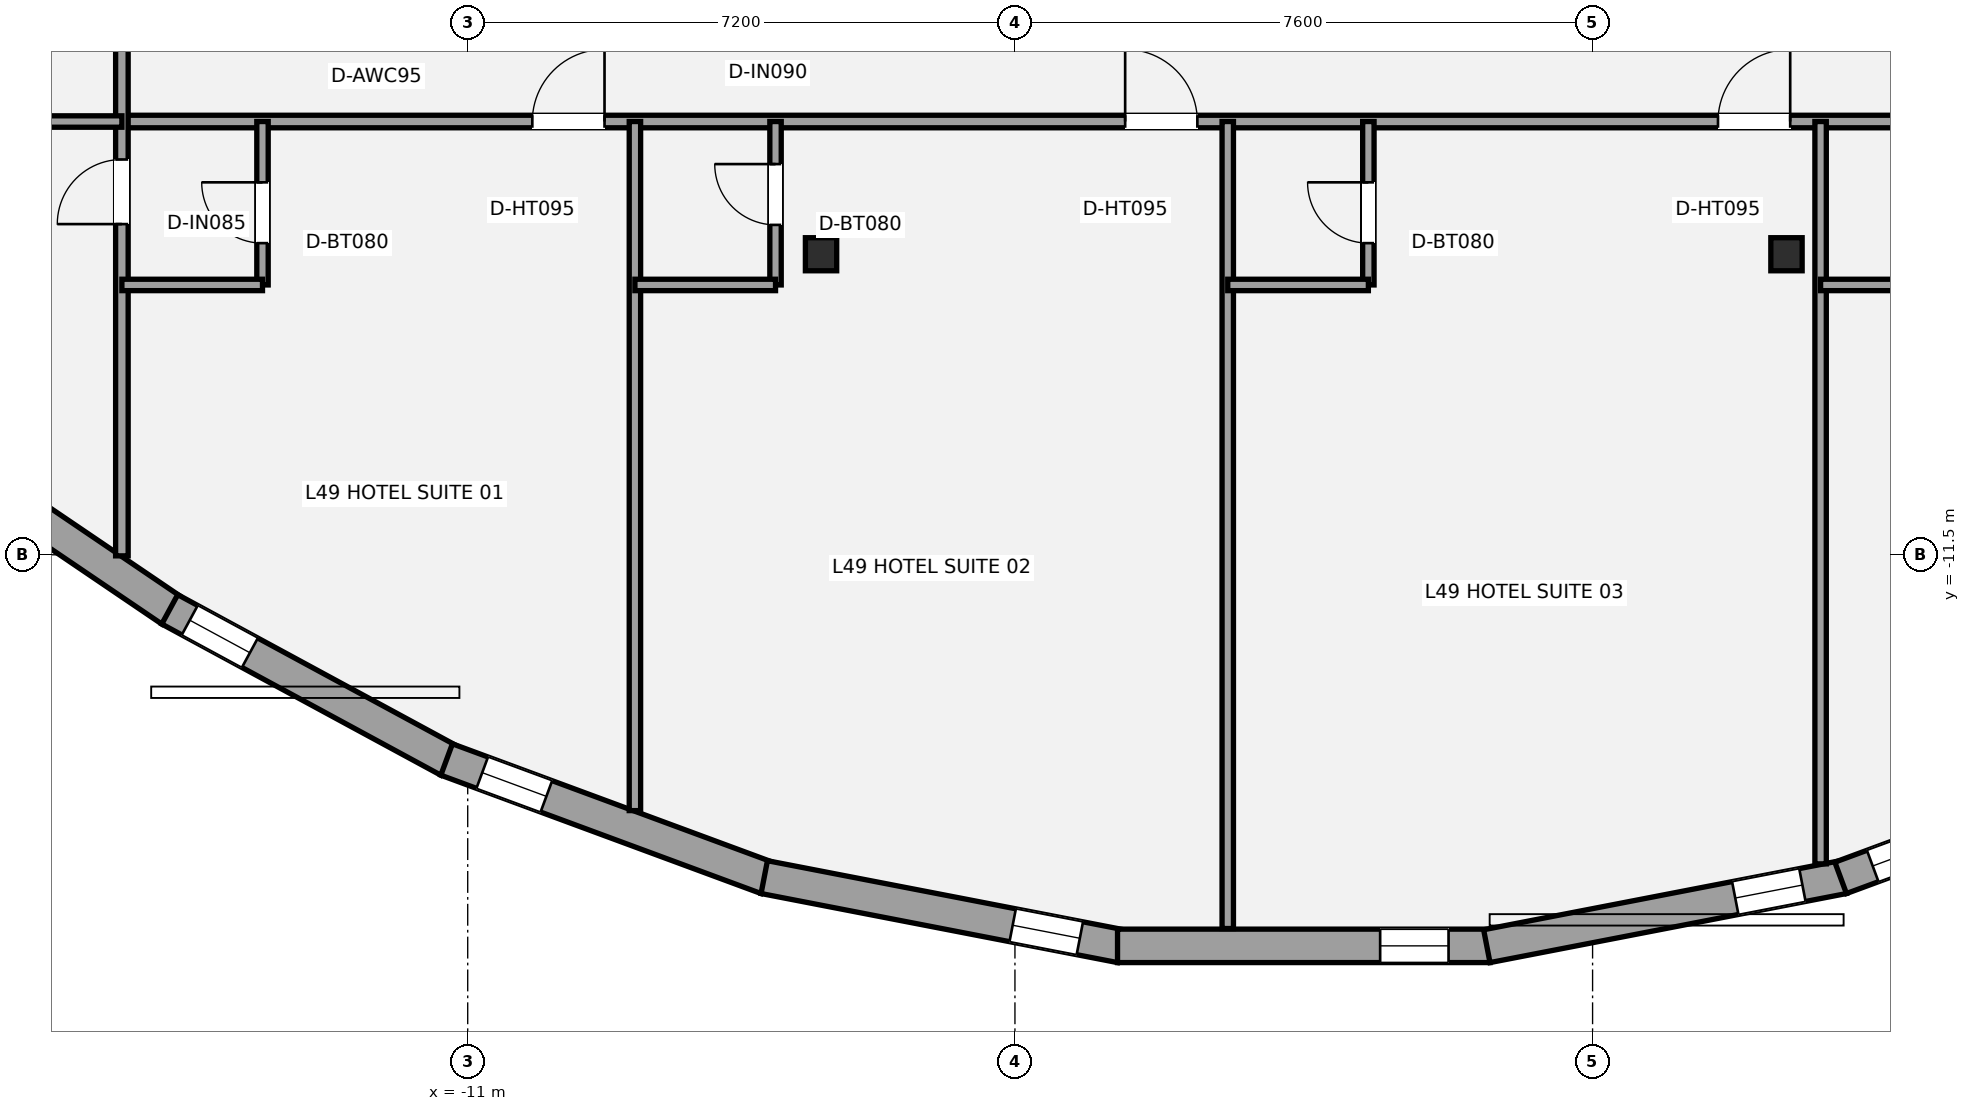
"""IFC4 building model, lengths in metres.
Left out: names, types, materials, properties, quantities, classifications, styles, units other than length and angle.
Written with IfcOpenShell. Run it as: python <this file> out.ifc"""

import sys

from ifc_helpers import new_model, si_unit, direction, frame, frame_2d, origin, origin_2d, place, context, subcontext, project, spatial, rectangle, i_section, extrude, element, fill, save


model = new_model("IFC4")
c1 = context("Model", 3, precision=1e-05, world=origin(), true_north=direction((0.0, 1.0)))
c2 = subcontext(c1, "Body", "Model", "MODEL_VIEW")
j1 = project(units=[si_unit("LENGTHUNIT", "METRE"), si_unit("PLANEANGLEUNIT", "RADIAN")], contexts=[c1])
p1 = place(None, origin())
s1 = spatial("IfcSite", under=j1, at=p1, CompositionType="ELEMENT")
p2 = place(p1, origin())
s2 = spatial("IfcBuilding", under=s1, at=p2, CompositionType="ELEMENT")
p3 = place(p2, frame((0.0, 0.0, 179.0)))
s3 = spatial("IfcBuildingStorey", under=s2, at=p3, CompositionType="ELEMENT", Elevation=179.0)
for number, where, z_axis, x_axis in (
    (1, (-6.351, -7.546, 0.0), (0.0, 0.0, 1.0), (1.0, 0.0, 0.0)),
    (2, (6.351, -7.546, 0.0), (0.0, 0.0, 1.0), (1.0, 0.0, 0.0)),
):
    element("IfcColumn", number, at=place(p3, frame(where, z_axis=z_axis, x_axis=x_axis)), inside=s3, PredefinedType="COLUMN", context=c2, shape_type="SweptSolid", body=[
        extrude(i_section(OverallWidth=0.412, OverallDepth=0.435, WebThickness=0.036, FlangeThickness=0.057, at=origin_2d()), origin(), (0.0, 0.0, 1.0), 3.2),
    ])
p4 = place(p3, frame((-14.902, -12.229, 0.0), z_axis=(0.0, 0.0, 1.0), x_axis=(-0.827725942945, 0.561132572015, 0.0)))
e3 = element("IfcWall", 3, at=p4, inside=s3, PredefinedType="STANDARD", context=c2, shape_type="SweptSolid", body=[
    extrude(rectangle(XDim=3.966, YDim=0.44, at=frame_2d((1.983, 0.0))), origin(), (0.0, 0.0, 1.0), 2.315),
])
p5 = place(p4, frame((2.768, 0.0, 0.58)))
e4 = element("IfcOpeningElement", 4, at=p5, cuts=e3, PredefinedType="OPENING", context=c2, shape_type="SweptSolid", body=[
    extrude(rectangle(XDim=0.9, YDim=1.35, at=frame_2d((0.45, 0.675))), frame((0.0, 0.23, 0.0), z_axis=(0.0, -1.0, 0.0), x_axis=(1.0, 0.0, 0.0)), (0.0, 0.0, 1.0), 0.46),
])
p6 = place(p3, frame((-11.249, -14.206, 0.0), z_axis=(0.0, 0.0, 1.0), x_axis=(-0.879306250646, 0.476256776933, 0.0)))
e5 = element("IfcWall", 5, at=p6, inside=s3, PredefinedType="STANDARD", context=c2, shape_type="SweptSolid", body=[
    extrude(rectangle(XDim=4.175, YDim=0.44, at=frame_2d((2.088, 0.0))), origin(), (0.0, 0.0, 1.0), 2.315),
])
p7 = place(p6, frame((2.976, 0.0, 0.58)))
e6 = element("IfcOpeningElement", 6, at=p7, cuts=e5, PredefinedType="OPENING", context=c2, shape_type="SweptSolid", body=[
    extrude(rectangle(XDim=0.9, YDim=1.35, at=frame_2d((0.45, 0.675))), frame((0.0, 0.23, 0.0), z_axis=(0.0, -1.0, 0.0), x_axis=(1.0, 0.0, 0.0)), (0.0, 0.0, 1.0), 0.46),
])
p8 = place(p3, frame((-7.064, -15.75, 0.0), z_axis=(0.0, 0.0, 1.0), x_axis=(-0.937993730452, 0.346652220004, 0.0)))
e7 = element("IfcWall", 7, at=p8, inside=s3, PredefinedType="STANDARD", context=c2, shape_type="SweptSolid", body=[
    extrude(rectangle(XDim=4.492, YDim=0.44, at=frame_2d((2.246, 0.0))), origin(), (0.0, 0.0, 1.0), 2.315),
])
p9 = place(p8, frame((3.093, 0.0, 0.58)))
e8 = element("IfcOpeningElement", 8, at=p9, cuts=e7, PredefinedType="OPENING", context=c2, shape_type="SweptSolid", body=[
    extrude(rectangle(XDim=0.9, YDim=1.35, at=frame_2d((0.45, 0.675))), frame((0.0, 0.23, 0.0), z_axis=(0.0, -1.0, 0.0), x_axis=(1.0, 0.0, 0.0)), (0.0, 0.0, 1.0), 0.46),
])
p10 = place(p3, frame((-2.408, -16.649, 0.0), z_axis=(0.0, 0.0, 1.0), x_axis=(-0.981751851942, 0.190166509166, 0.0)))
e9 = element("IfcWall", 9, at=p10, inside=s3, PredefinedType="STANDARD", context=c2, shape_type="SweptSolid", body=[
    extrude(rectangle(XDim=4.777, YDim=0.44, at=frame_2d((2.389, 0.0))), origin(), (0.0, 0.0, 1.0), 2.315),
])
p11 = place(p10, frame((0.548, 0.0, 0.58)))
e10 = element("IfcOpeningElement", 10, at=p11, cuts=e9, PredefinedType="OPENING", context=c2, shape_type="SweptSolid", body=[
    extrude(rectangle(XDim=0.9, YDim=1.35, at=frame_2d((0.45, 0.675))), frame((0.0, 0.23, 0.0), z_axis=(0.0, -1.0, 0.0), x_axis=(1.0, 0.0, 0.0)), (0.0, 0.0, 1.0), 0.46),
])
p12 = place(p3, frame((2.45, -16.645, 0.0), z_axis=(0.0, 0.0, 1.0), x_axis=(-1.0, 0.0, 0.0)))
e11 = element("IfcWall", 11, at=p12, inside=s3, PredefinedType="STANDARD", context=c2, shape_type="SweptSolid", body=[
    extrude(rectangle(XDim=4.9, YDim=0.44, at=frame_2d((2.45, 0.0))), origin(), (0.0, 0.0, 1.0), 2.315),
])
p13 = place(p12, frame((0.545, 0.0, 0.58)))
e12 = element("IfcOpeningElement", 12, at=p13, cuts=e11, PredefinedType="OPENING", context=c2, shape_type="SweptSolid", body=[
    extrude(rectangle(XDim=0.9, YDim=1.35, at=frame_2d((0.45, 0.675))), frame((0.0, 0.23, 0.0), z_axis=(0.0, -1.0, 0.0), x_axis=(1.0, 0.0, 0.0)), (0.0, 0.0, 1.0), 0.46),
])
p14 = place(p3, frame((7.098, -15.741, 0.0), z_axis=(0.0, 0.0, 1.0), x_axis=(-0.981751851942, -0.190166509166, 0.0)))
e13 = element("IfcWall", 13, at=p14, inside=s3, PredefinedType="STANDARD", context=c2, shape_type="SweptSolid", body=[
    extrude(rectangle(XDim=4.777, YDim=0.44, at=frame_2d((2.389, 0.0))), origin(), (0.0, 0.0, 1.0), 2.315),
])
p15 = place(p14, frame((0.548, 0.0, 0.58)))
e14 = element("IfcOpeningElement", 14, at=p15, cuts=e13, PredefinedType="OPENING", context=c2, shape_type="SweptSolid", body=[
    extrude(rectangle(XDim=0.9, YDim=1.35, at=frame_2d((0.45, 0.675))), frame((0.0, 0.23, 0.0), z_axis=(0.0, -1.0, 0.0), x_axis=(1.0, 0.0, 0.0)), (0.0, 0.0, 1.0), 0.46),
])
p16 = place(p3, frame((11.277, -14.193, 0.0), z_axis=(0.0, 0.0, 1.0), x_axis=(-0.937993730452, -0.346652220004, 0.0)))
e15 = element("IfcWall", 15, at=p16, inside=s3, PredefinedType="STANDARD", context=c2, shape_type="SweptSolid", body=[
    extrude(rectangle(XDim=4.492, YDim=0.44, at=frame_2d((2.246, 0.0))), origin(), (0.0, 0.0, 1.0), 2.315),
])
p17 = place(p16, frame((3.143, 0.0, 0.58)))
e16 = element("IfcOpeningElement", 16, at=p17, cuts=e15, PredefinedType="OPENING", context=c2, shape_type="SweptSolid", body=[
    extrude(rectangle(XDim=0.9, YDim=1.35, at=frame_2d((0.45, 0.675))), frame((0.0, 0.23, 0.0), z_axis=(0.0, -1.0, 0.0), x_axis=(1.0, 0.0, 0.0)), (0.0, 0.0, 1.0), 0.46),
])
p18 = place(p3, frame((-15.55, -5.8, 0.0), z_axis=(0.0, 0.0, 1.0), x_axis=(1.0, 0.0, 0.0)))
e17 = element("IfcWall", 17, at=p18, inside=s3, PredefinedType="PARTITIONING", context=c2, shape_type="SweptSolid", body=[
    extrude(rectangle(XDim=31.1, YDim=0.165, at=frame_2d((15.55, 0.0))), origin(), (0.0, 0.0, 1.0), 2.398),
])
p19 = place(p18, frame((5.4, 0.0, 0.0)))
e18 = element("IfcOpeningElement", 18, at=p19, cuts=e17, PredefinedType="OPENING", context=c2, shape_type="SweptSolid", body=[
    extrude(rectangle(XDim=0.95, YDim=2.15, at=frame_2d((0.475, 1.075))), frame((0.0, 0.093, 0.0), z_axis=(0.0, -1.0, 0.0), x_axis=(1.0, 0.0, 0.0)), (0.0, 0.0, 1.0), 0.185),
])
p20 = place(p18, frame((13.2, 0.0, 0.0)))
e19 = element("IfcOpeningElement", 19, at=p20, cuts=e17, PredefinedType="OPENING", context=c2, shape_type="SweptSolid", body=[
    extrude(rectangle(XDim=0.95, YDim=2.15, at=frame_2d((0.475, 1.075))), frame((0.0, 0.093, 0.0), z_axis=(0.0, -1.0, 0.0), x_axis=(1.0, 0.0, 0.0)), (0.0, 0.0, 1.0), 0.185),
])
p21 = place(p18, frame((21.0, 0.0, 0.0)))
e20 = element("IfcOpeningElement", 20, at=p21, cuts=e17, PredefinedType="OPENING", context=c2, shape_type="SweptSolid", body=[
    extrude(rectangle(XDim=0.95, YDim=2.15, at=frame_2d((0.475, 1.075))), frame((0.0, 0.093, 0.0), z_axis=(0.0, -1.0, 0.0), x_axis=(1.0, 0.0, 0.0)), (0.0, 0.0, 1.0), 0.185),
])
p22 = place(p18, frame((29.75, 0.0, 0.0)))
e21 = element("IfcOpeningElement", 21, at=p22, cuts=e17, PredefinedType="OPENING", context=c2, shape_type="SweptSolid", body=[
    extrude(rectangle(XDim=0.95, YDim=2.15, at=frame_2d((0.475, 1.075))), frame((0.0, 0.093, 0.0), z_axis=(0.0, -1.0, 0.0), x_axis=(1.0, 0.0, 0.0)), (0.0, 0.0, 1.0), 0.185),
])
p23 = place(p3, frame((-15.55, -11.514, 0.0), z_axis=(0.0, 0.0, 1.0), x_axis=(0.0, 1.0, 0.0)))
e22 = element("IfcWall", 22, at=p23, inside=s3, PredefinedType="PARTITIONING", context=c2, shape_type="SweptSolid", body=[
    extrude(rectangle(XDim=19.064, YDim=0.165, at=frame_2d((9.532, 0.0))), origin(), (0.0, 0.0, 1.0), 2.473),
])
p24 = place(p23, frame((4.365, 0.0, 0.0)))
e23 = element("IfcOpeningElement", 23, at=p24, cuts=e22, PredefinedType="OPENING", context=c2, shape_type="SweptSolid", body=[
    extrude(rectangle(XDim=0.85, YDim=2.1, at=frame_2d((0.425, 1.05))), frame((0.0, 0.093, 0.0), z_axis=(0.0, -1.0, 0.0), x_axis=(1.0, 0.0, 0.0)), (0.0, 0.0, 1.0), 0.185),
])
p25 = place(p23, frame((7.515, 0.0, 0.0)))
e24 = element("IfcOpeningElement", 24, at=p25, cuts=e22, PredefinedType="OPENING", context=c2, shape_type="SweptSolid", body=[
    extrude(rectangle(XDim=1.0, YDim=2.15, at=frame_2d((0.5, 1.075))), frame((0.0, 0.093, 0.0), z_axis=(0.0, -1.0, 0.0), x_axis=(1.0, 0.0, 0.0)), (0.0, 0.0, 1.0), 0.185),
])
p26 = place(p23, frame((11.915, 0.0, 0.0)))
e25 = element("IfcOpeningElement", 25, at=p26, cuts=e22, PredefinedType="OPENING", context=c2, shape_type="SweptSolid", body=[
    extrude(rectangle(XDim=1.0, YDim=2.15, at=frame_2d((0.5, 1.075))), frame((0.0, 0.093, 0.0), z_axis=(0.0, -1.0, 0.0), x_axis=(1.0, 0.0, 0.0)), (0.0, 0.0, 1.0), 0.185),
])
p27 = place(p23, frame((16.29, 0.0, 0.0)))
e26 = element("IfcOpeningElement", 26, at=p27, cuts=e22, PredefinedType="OPENING", context=c2, shape_type="SweptSolid", body=[
    extrude(rectangle(XDim=1.0, YDim=2.15, at=frame_2d((0.5, 1.075))), frame((0.0, 0.093, 0.0), z_axis=(0.0, -1.0, 0.0), x_axis=(1.0, 0.0, 0.0)), (0.0, 0.0, 1.0), 0.185),
])
p28 = place(p3, frame((-22.192, -5.8, 0.0), z_axis=(0.0, 0.0, 1.0), x_axis=(1.0, 0.0, 0.0)))
e27 = element("IfcWall", 27, at=p28, inside=s3, PredefinedType="PLUMBINGWALL", context=c2, shape_type="SweptSolid", body=[
    extrude(rectangle(XDim=6.642, YDim=0.15, at=frame_2d((3.321, 0.0))), origin(), (0.0, 0.0, 1.0), 2.473),
])
p29 = place(p3, frame((-8.8, -14.866, 0.0), z_axis=(0.0, 0.0, 1.0), x_axis=(0.0, 1.0, 0.0)))
e28 = element("IfcWall", 28, at=p29, inside=s3, PredefinedType="PLUMBINGWALL", context=c2, shape_type="SweptSolid", body=[
    extrude(rectangle(XDim=9.066, YDim=0.15, at=frame_2d((4.533, 0.0))), origin(), (0.0, 0.0, 1.0), 3.02),
])
p30 = place(p3, frame((-1.0, -16.417, 0.0), z_axis=(0.0, 0.0, 1.0), x_axis=(0.0, 1.0, 0.0)))
e29 = element("IfcWall", 29, at=p30, inside=s3, PredefinedType="PLUMBINGWALL", context=c2, shape_type="SweptSolid", body=[
    extrude(rectangle(XDim=10.617, YDim=0.15, at=frame_2d((5.309, 0.0))), origin(), (0.0, 0.0, 1.0), 2.473),
])
p31 = place(p3, frame((6.8, -15.566, 0.0), z_axis=(0.0, 0.0, 1.0), x_axis=(0.0, 1.0, 0.0)))
e30 = element("IfcWall", 30, at=p31, inside=s3, PredefinedType="PLUMBINGWALL", context=c2, shape_type="SweptSolid", body=[
    extrude(rectangle(XDim=9.766, YDim=0.15, at=frame_2d((4.883, 0.0))), origin(), (0.0, 0.0, 1.0), 2.473),
])
p32 = place(p3, frame((-13.7, -7.95, 0.0), z_axis=(0.0, 0.0, 1.0), x_axis=(0.0, 1.0, 0.0)))
e31 = element("IfcWall", 31, at=p32, inside=s3, PredefinedType="PLUMBINGWALL", context=c2, shape_type="SweptSolid", body=[
    extrude(rectangle(XDim=2.15, YDim=0.15, at=frame_2d((1.075, 0.0))), origin(), (0.0, 0.0, 1.0), 2.473),
])
p33 = place(p32, frame((0.55, 0.0, 0.0)))
e32 = element("IfcOpeningElement", 32, at=p33, cuts=e31, PredefinedType="OPENING", context=c2, shape_type="SweptSolid", body=[
    extrude(rectangle(XDim=0.8, YDim=2.1, at=frame_2d((0.4, 1.05))), frame((0.0, 0.085, 0.0), z_axis=(0.0, -1.0, 0.0), x_axis=(1.0, 0.0, 0.0)), (0.0, 0.0, 1.0), 0.17),
])
p34 = place(p3, frame((-15.55, -7.95, 0.0), z_axis=(0.0, 0.0, 1.0), x_axis=(1.0, 0.0, 0.0)))
e33 = element("IfcWall", 33, at=p34, inside=s3, PredefinedType="PLUMBINGWALL", context=c2, shape_type="SweptSolid", body=[
    extrude(rectangle(XDim=1.85, YDim=0.15, at=frame_2d((0.925, 0.0))), origin(), (0.0, 0.0, 1.0), 2.473),
])
p35 = place(p3, frame((-6.95, -7.95, 0.0), z_axis=(0.0, 0.0, 1.0), x_axis=(0.0, 1.0, 0.0)))
e34 = element("IfcWall", 34, at=p35, inside=s3, PredefinedType="PLUMBINGWALL", context=c2, shape_type="SweptSolid", body=[
    extrude(rectangle(XDim=2.15, YDim=0.15, at=frame_2d((1.075, 0.0))), origin(), (0.0, 0.0, 1.0), 2.473),
])
p36 = place(p35, frame((0.79, 0.0, 0.0)))
e35 = element("IfcOpeningElement", 35, at=p36, cuts=e34, PredefinedType="OPENING", context=c2, shape_type="SweptSolid", body=[
    extrude(rectangle(XDim=0.8, YDim=2.1, at=frame_2d((0.4, 1.05))), frame((0.0, 0.085, 0.0), z_axis=(0.0, -1.0, 0.0), x_axis=(1.0, 0.0, 0.0)), (0.0, 0.0, 1.0), 0.17),
])
p37 = place(p3, frame((-8.8, -7.95, 0.0), z_axis=(0.0, 0.0, 1.0), x_axis=(1.0, 0.0, 0.0)))
e36 = element("IfcWall", 36, at=p37, inside=s3, PredefinedType="PLUMBINGWALL", context=c2, shape_type="SweptSolid", body=[
    extrude(rectangle(XDim=1.85, YDim=0.15, at=frame_2d((0.925, 0.0))), origin(), (0.0, 0.0, 1.0), 2.473),
])
p38 = place(p3, frame((0.85, -7.95, 0.0), z_axis=(0.0, 0.0, 1.0), x_axis=(0.0, 1.0, 0.0)))
e37 = element("IfcWall", 37, at=p38, inside=s3, PredefinedType="PLUMBINGWALL", context=c2, shape_type="SweptSolid", body=[
    extrude(rectangle(XDim=2.15, YDim=0.15, at=frame_2d((1.075, 0.0))), origin(), (0.0, 0.0, 1.0), 3.02),
])
p39 = place(p38, frame((0.55, 0.0, 0.0)))
e38 = element("IfcOpeningElement", 38, at=p39, cuts=e37, PredefinedType="OPENING", context=c2, shape_type="SweptSolid", body=[
    extrude(rectangle(XDim=0.8, YDim=2.1, at=frame_2d((0.4, 1.05))), frame((0.0, 0.085, 0.0), z_axis=(0.0, -1.0, 0.0), x_axis=(1.0, 0.0, 0.0)), (0.0, 0.0, 1.0), 0.17),
])
p40 = place(p3, frame((-1.0, -7.95, 0.0), z_axis=(0.0, 0.0, 1.0), x_axis=(1.0, 0.0, 0.0)))
e39 = element("IfcWall", 39, at=p40, inside=s3, PredefinedType="PLUMBINGWALL", context=c2, shape_type="SweptSolid", body=[
    extrude(rectangle(XDim=1.85, YDim=0.15, at=frame_2d((0.925, 0.0))), origin(), (0.0, 0.0, 1.0), 3.02),
])
p41 = place(p3, frame((6.8, -7.95, 0.0), z_axis=(0.0, 0.0, 1.0), x_axis=(1.0, 0.0, 0.0)))
e40 = element("IfcWall", 40, at=p41, inside=s3, PredefinedType="PLUMBINGWALL", context=c2, shape_type="SweptSolid", body=[
    extrude(rectangle(XDim=1.85, YDim=0.15, at=frame_2d((0.925, 0.0))), origin(), (0.0, 0.0, 1.0), 3.02),
])
p42 = place(p7, origin())
e41 = element("IfcWindow", 41, at=p42, inside=s3, PartitioningType="SINGLE_PANEL", PredefinedType="WINDOW", context=c2, shape_type="SweptSolid", body=[
    extrude(rectangle(XDim=0.9, YDim=1.35, at=frame_2d((0.45, 0.675))), frame((0.0, -0.01, 0.0), z_axis=(0.0, -1.0, 0.0), x_axis=(1.0, 0.0, 0.0)), (0.0, 0.0, 1.0), 0.06),
])
fill(e6, e41)
p43 = place(p9, origin())
e42 = element("IfcWindow", 42, at=p43, inside=s3, PartitioningType="SINGLE_PANEL", PredefinedType="WINDOW", context=c2, shape_type="SweptSolid", body=[
    extrude(rectangle(XDim=0.9, YDim=1.35, at=frame_2d((0.45, 0.675))), frame((0.0, -0.01, 0.0), z_axis=(0.0, -1.0, 0.0), x_axis=(1.0, 0.0, 0.0)), (0.0, 0.0, 1.0), 0.06),
])
fill(e8, e42)
p44 = place(p11, origin())
e43 = element("IfcWindow", 43, at=p44, inside=s3, PartitioningType="SINGLE_PANEL", PredefinedType="WINDOW", context=c2, shape_type="SweptSolid", body=[
    extrude(rectangle(XDim=0.9, YDim=1.35, at=frame_2d((0.45, 0.675))), frame((0.0, -0.01, 0.0), z_axis=(0.0, -1.0, 0.0), x_axis=(1.0, 0.0, 0.0)), (0.0, 0.0, 1.0), 0.06),
])
fill(e10, e43)
p45 = place(p13, origin())
e44 = element("IfcWindow", 44, at=p45, inside=s3, PartitioningType="SINGLE_PANEL", PredefinedType="WINDOW", context=c2, shape_type="SweptSolid", body=[
    extrude(rectangle(XDim=0.9, YDim=1.35, at=frame_2d((0.45, 0.675))), frame((0.0, -0.01, 0.0), z_axis=(0.0, -1.0, 0.0), x_axis=(1.0, 0.0, 0.0)), (0.0, 0.0, 1.0), 0.06),
])
fill(e12, e44)
p46 = place(p15, origin())
e45 = element("IfcWindow", 45, at=p46, inside=s3, PartitioningType="SINGLE_PANEL", PredefinedType="WINDOW", context=c2, shape_type="SweptSolid", body=[
    extrude(rectangle(XDim=0.9, YDim=1.35, at=frame_2d((0.45, 0.675))), frame((0.0, -0.01, 0.0), z_axis=(0.0, -1.0, 0.0), x_axis=(1.0, 0.0, 0.0)), (0.0, 0.0, 1.0), 0.06),
])
fill(e14, e45)
p47 = place(p17, origin())
e46 = element("IfcWindow", 46, at=p47, inside=s3, PartitioningType="SINGLE_PANEL", PredefinedType="WINDOW", context=c2, shape_type="SweptSolid", body=[
    extrude(rectangle(XDim=0.9, YDim=1.35, at=frame_2d((0.45, 0.675))), frame((0.0, -0.01, 0.0), z_axis=(0.0, -1.0, 0.0), x_axis=(1.0, 0.0, 0.0)), (0.0, 0.0, 1.0), 0.06),
])
fill(e16, e46)
p48 = place(p24, origin())
e47 = element("IfcDoor", 47, at=p48, inside=s3, OperationType="SINGLE_SWING_LEFT", PredefinedType="DOOR", context=c2, shape_type="SweptSolid", body=[
    extrude(rectangle(XDim=0.85, YDim=2.1, at=frame_2d((0.425, 1.05))), frame((0.0, 0.025, 0.0), z_axis=(0.0, -1.0, 0.0), x_axis=(1.0, 0.0, 0.0)), (0.0, 0.0, 1.0), 0.05),
])
fill(e23, e47)
p49 = place(p19, origin())
e48 = element("IfcDoor", 48, at=p49, inside=s3, OperationType="SINGLE_SWING_RIGHT", PredefinedType="DOOR", context=c2, shape_type="SweptSolid", body=[
    extrude(rectangle(XDim=0.95, YDim=2.15, at=frame_2d((0.475, 1.075))), frame((0.0, 0.025, 0.0), z_axis=(0.0, -1.0, 0.0), x_axis=(1.0, 0.0, 0.0)), (0.0, 0.0, 1.0), 0.05),
])
fill(e18, e48)
p50 = place(p33, origin())
e49 = element("IfcDoor", 49, at=p50, inside=s3, OperationType="SINGLE_SWING_RIGHT", PredefinedType="DOOR", context=c2, shape_type="SweptSolid", body=[
    extrude(rectangle(XDim=0.8, YDim=2.1, at=frame_2d((0.4, 1.05))), frame((0.0, 0.025, 0.0), z_axis=(0.0, -1.0, 0.0), x_axis=(1.0, 0.0, 0.0)), (0.0, 0.0, 1.0), 0.05),
])
fill(e32, e49)
p51 = place(p20, origin())
e50 = element("IfcDoor", 50, at=p51, inside=s3, OperationType="SINGLE_SWING_LEFT", PredefinedType="DOOR", context=c2, shape_type="SweptSolid", body=[
    extrude(rectangle(XDim=0.95, YDim=2.15, at=frame_2d((0.475, 1.075))), frame((0.0, 0.025, 0.0), z_axis=(0.0, -1.0, 0.0), x_axis=(1.0, 0.0, 0.0)), (0.0, 0.0, 1.0), 0.05),
])
fill(e19, e50)
p52 = place(p36, origin())
e51 = element("IfcDoor", 51, at=p52, inside=s3, OperationType="SINGLE_SWING_RIGHT", PredefinedType="DOOR", context=c2, shape_type="SweptSolid", body=[
    extrude(rectangle(XDim=0.8, YDim=2.1, at=frame_2d((0.4, 1.05))), frame((0.0, 0.025, 0.0), z_axis=(0.0, -1.0, 0.0), x_axis=(1.0, 0.0, 0.0)), (0.0, 0.0, 1.0), 0.05),
])
fill(e35, e51)
p53 = place(p21, origin())
e52 = element("IfcDoor", 52, at=p53, inside=s3, OperationType="SINGLE_SWING_RIGHT", PredefinedType="DOOR", context=c2, shape_type="SweptSolid", body=[
    extrude(rectangle(XDim=0.95, YDim=2.15, at=frame_2d((0.475, 1.075))), frame((0.0, 0.025, 0.0), z_axis=(0.0, -1.0, 0.0), x_axis=(1.0, 0.0, 0.0)), (0.0, 0.0, 1.0), 0.05),
])
fill(e20, e52)
p54 = place(p39, origin())
e53 = element("IfcDoor", 53, at=p54, inside=s3, OperationType="SINGLE_SWING_RIGHT", PredefinedType="DOOR", context=c2, shape_type="SweptSolid", body=[
    extrude(rectangle(XDim=0.8, YDim=2.1, at=frame_2d((0.4, 1.05))), frame((0.0, 0.025, 0.0), z_axis=(0.0, -1.0, 0.0), x_axis=(1.0, 0.0, 0.0)), (0.0, 0.0, 1.0), 0.05),
])
fill(e38, e53)
save(model, sys.argv[1])
